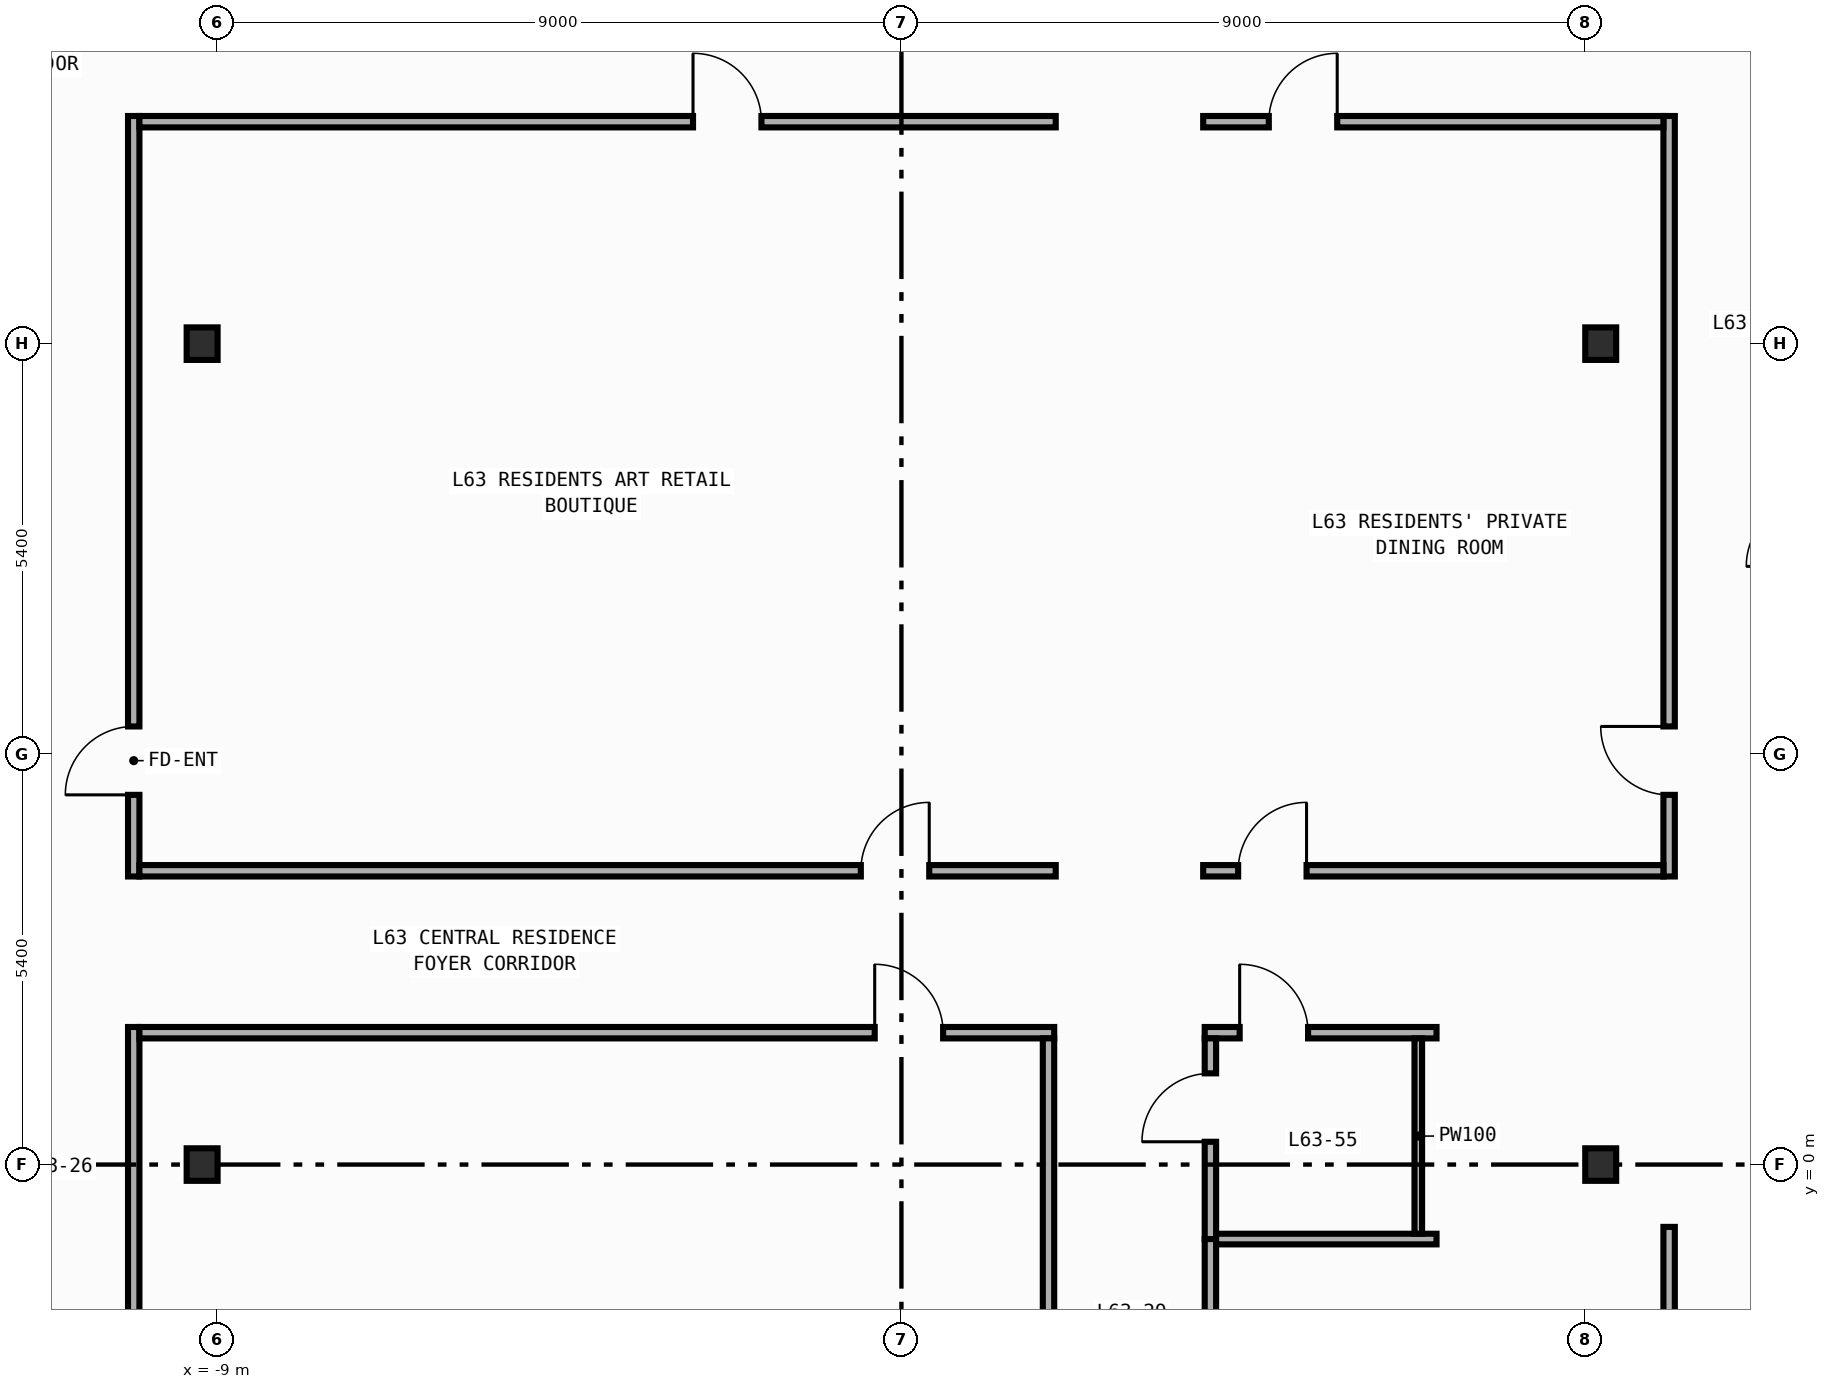
"""IFC4 building model, lengths in metres.
Left out: names, types, materials, properties, quantities, classifications, styles, units other than length and angle.
Written with IfcOpenShell. Run it as: python <this file> out.ifc"""

import sys

from ifc_helpers import new_model, si_unit, direction, frame, frame_2d, origin, origin_2d, place, context, subcontext, project, spatial, rectangle, i_section, extrude, element, fill, save


model = new_model("IFC4")
c1 = context("Model", 3, precision=1e-05, world=origin(), true_north=direction((0.0, 1.0)))
c2 = subcontext(c1, "Body", "Model", "MODEL_VIEW")
j1 = project(units=[si_unit("LENGTHUNIT", "METRE"), si_unit("PLANEANGLEUNIT", "RADIAN")], contexts=[c1])
p1 = place(None, origin())
s1 = spatial("IfcSite", under=j1, at=p1, CompositionType="ELEMENT")
p2 = place(p1, origin())
s2 = spatial("IfcBuilding", under=s1, at=p2, CompositionType="ELEMENT")
p3 = place(p2, frame((0.0, 0.0, 265.6)))
s3 = spatial("IfcBuildingStorey", under=s2, at=p3, CompositionType="ELEMENT", Elevation=265.6)
for number, where, z_axis, x_axis in (
    (1, (-9.2, 0.0, 0.0), (0.0, 0.0, 1.0), (1.0, 0.0, 0.0)),
    (2, (-9.2, 10.8, 0.0), (0.0, 0.0, 1.0), (1.0, 0.0, 0.0)),
    (3, (9.2, 0.0, 0.0), (0.0, 0.0, 1.0), (1.0, 0.0, 0.0)),
    (4, (9.2, 10.8, 0.0), (0.0, 0.0, 1.0), (1.0, 0.0, 0.0)),
):
    element("IfcColumn", number, at=place(p3, frame(where, z_axis=z_axis, x_axis=x_axis)), inside=s3, PredefinedType="COLUMN", context=c2, shape_type="SweptSolid", body=[
        extrude(i_section(OverallWidth=0.407, OverallDepth=0.428, WebThickness=0.02, FlangeThickness=0.035, FilletRadius=0.022, at=origin_2d()), origin(), (0.0, 0.0, 1.0), 3.6),
    ])
p4 = place(p3, frame((-10.1, 3.79, 0.0), z_axis=(0.0, 0.0, 1.0), x_axis=(0.0, 1.0, 0.0)))
e5 = element("IfcWall", 5, at=p4, inside=s3, PredefinedType="PARTITIONING", context=c2, shape_type="SweptSolid", body=[
    extrude(rectangle(XDim=10.005, YDim=0.15, at=frame_2d((5.002, 0.0))), origin(), (0.0, 0.0, 1.0), 3.34),
])
p5 = place(p4, frame((1.074, 0.0, 0.0)))
e6 = element("IfcOpeningElement", 6, at=p5, cuts=e5, PredefinedType="OPENING", context=c2, shape_type="SweptSolid", body=[
    extrude(rectangle(XDim=0.9, YDim=2.15, at=frame_2d((0.45, 1.075))), frame((0.0, 0.085, 0.0), z_axis=(0.0, -1.0, 0.0), x_axis=(1.0, 0.0, 0.0)), (0.0, 0.0, 1.0), 0.17),
])
p6 = place(p3, frame((-10.1, -13.795, 0.0), z_axis=(0.0, 0.0, 1.0), x_axis=(0.0, 1.0, 0.0)))
e7 = element("IfcWall", 7, at=p6, inside=s3, PredefinedType="PARTITIONING", context=c2, shape_type="SweptSolid", body=[
    extrude(rectangle(XDim=15.605, YDim=0.15, at=frame_2d((7.802, 0.0))), origin(), (0.0, 0.0, 1.0), 3.34),
])
p7 = place(p6, frame((7.961, 0.0, 0.0)))
e8 = element("IfcOpeningElement", 8, at=p7, cuts=e7, PredefinedType="OPENING", context=c2, shape_type="SweptSolid", body=[
    extrude(rectangle(XDim=0.9, YDim=2.15, at=frame_2d((0.45, 1.075))), frame((0.0, 0.085, 0.0), z_axis=(0.0, -1.0, 0.0), x_axis=(1.0, 0.0, 0.0)), (0.0, 0.0, 1.0), 0.17),
])
p8 = place(p3, frame((10.1, 3.79, 0.0), z_axis=(0.0, 0.0, 1.0), x_axis=(0.0, 1.0, 0.0)))
e9 = element("IfcWall", 9, at=p8, inside=s3, PredefinedType="PARTITIONING", context=c2, shape_type="SweptSolid", body=[
    extrude(rectangle(XDim=10.005, YDim=0.15, at=frame_2d((5.002, 0.0))), origin(), (0.0, 0.0, 1.0), 3.34),
])
p9 = place(p8, frame((1.074, 0.0, 0.0)))
e10 = element("IfcOpeningElement", 10, at=p9, cuts=e9, PredefinedType="OPENING", context=c2, shape_type="SweptSolid", body=[
    extrude(rectangle(XDim=0.9, YDim=2.15, at=frame_2d((0.45, 1.075))), frame((0.0, 0.085, 0.0), z_axis=(0.0, -1.0, 0.0), x_axis=(1.0, 0.0, 0.0)), (0.0, 0.0, 1.0), 0.17),
])
p10 = place(p3, frame((10.1, -13.795, 0.0), z_axis=(0.0, 0.0, 1.0), x_axis=(0.0, 1.0, 0.0)))
e11 = element("IfcWall", 11, at=p10, inside=s3, PredefinedType="PARTITIONING", context=c2, shape_type="SweptSolid", body=[
    extrude(rectangle(XDim=12.975, YDim=0.15, at=frame_2d((6.487, 0.0))), origin(), (0.0, 0.0, 1.0), 3.34),
])
p11 = place(p10, frame((7.964, 0.0, 0.0)))
e12 = element("IfcOpeningElement", 12, at=p11, cuts=e11, PredefinedType="OPENING", context=c2, shape_type="SweptSolid", body=[
    extrude(rectangle(XDim=0.9, YDim=2.15, at=frame_2d((0.45, 1.075))), frame((0.0, 0.085, 0.0), z_axis=(0.0, -1.0, 0.0), x_axis=(1.0, 0.0, 0.0)), (0.0, 0.0, 1.0), 0.17),
])
p12 = place(p3, frame((-10.025, 3.865, 0.0), z_axis=(0.0, 0.0, 1.0), x_axis=(1.0, 0.0, 0.0)))
e13 = element("IfcWall", 13, at=p12, inside=s3, PredefinedType="PARTITIONING", context=c2, shape_type="SweptSolid", body=[
    extrude(rectangle(XDim=12.055, YDim=0.15, at=frame_2d((6.027, 0.0))), origin(), (0.0, 0.0, 1.0), 3.34),
])
p13 = place(p12, frame((9.491, 0.0, 0.0)))
e14 = element("IfcOpeningElement", 14, at=p13, cuts=e13, PredefinedType="OPENING", context=c2, shape_type="SweptSolid", body=[
    extrude(rectangle(XDim=0.9, YDim=2.15, at=frame_2d((0.45, 1.075))), frame((0.0, 0.085, 0.0), z_axis=(0.0, -1.0, 0.0), x_axis=(1.0, 0.0, 0.0)), (0.0, 0.0, 1.0), 0.17),
])
p14 = place(p3, frame((-10.025, 1.735, 0.0), z_axis=(0.0, 0.0, 1.0), x_axis=(1.0, 0.0, 0.0)))
e15 = element("IfcWall", 15, at=p14, inside=s3, PredefinedType="PARTITIONING", context=c2, shape_type="SweptSolid", body=[
    extrude(rectangle(XDim=12.035, YDim=0.15, at=frame_2d((6.018, 0.0))), origin(), (0.0, 0.0, 1.0), 3.34),
])
p15 = place(p14, frame((9.674, 0.0, 0.0)))
e16 = element("IfcOpeningElement", 16, at=p15, cuts=e15, PredefinedType="OPENING", context=c2, shape_type="SweptSolid", body=[
    extrude(rectangle(XDim=0.9, YDim=2.15, at=frame_2d((0.45, 1.075))), frame((0.0, 0.085, 0.0), z_axis=(0.0, -1.0, 0.0), x_axis=(1.0, 0.0, 0.0)), (0.0, 0.0, 1.0), 0.17),
])
p16 = place(p3, frame((3.97, 3.865, 0.0), z_axis=(0.0, 0.0, 1.0), x_axis=(1.0, 0.0, 0.0)))
e17 = element("IfcWall", 17, at=p16, inside=s3, PredefinedType="PARTITIONING", context=c2, shape_type="SweptSolid", body=[
    extrude(rectangle(XDim=6.055, YDim=0.15, at=frame_2d((3.027, 0.0))), origin(), (0.0, 0.0, 1.0), 3.34),
])
p17 = place(p16, frame((0.46, 0.0, 0.0)))
e18 = element("IfcOpeningElement", 18, at=p17, cuts=e17, PredefinedType="OPENING", context=c2, shape_type="SweptSolid", body=[
    extrude(rectangle(XDim=0.9, YDim=2.15, at=frame_2d((0.45, 1.075))), frame((0.0, 0.085, 0.0), z_axis=(0.0, -1.0, 0.0), x_axis=(1.0, 0.0, 0.0)), (0.0, 0.0, 1.0), 0.17),
])
p18 = place(p3, frame((3.99, 1.735, 0.0), z_axis=(0.0, 0.0, 1.0), x_axis=(1.0, 0.0, 0.0)))
e19 = element("IfcWall", 19, at=p18, inside=s3, PredefinedType="PARTITIONING", context=c2, shape_type="SweptSolid", body=[
    extrude(rectangle(XDim=3.05, YDim=0.15, at=frame_2d((1.525, 0.0))), origin(), (0.0, 0.0, 1.0), 3.34),
])
p19 = place(p18, frame((0.46, 0.0, 0.0)))
e20 = element("IfcOpeningElement", 20, at=p19, cuts=e19, PredefinedType="OPENING", context=c2, shape_type="SweptSolid", body=[
    extrude(rectangle(XDim=0.9, YDim=2.15, at=frame_2d((0.45, 1.075))), frame((0.0, 0.085, 0.0), z_axis=(0.0, -1.0, 0.0), x_axis=(1.0, 0.0, 0.0)), (0.0, 0.0, 1.0), 0.17),
])
p20 = place(p3, frame((1.935, -13.795, 0.0), z_axis=(0.0, 0.0, 1.0), x_axis=(0.0, 1.0, 0.0)))
e21 = element("IfcWall", 21, at=p20, inside=s3, PredefinedType="PARTITIONING", context=c2, shape_type="SweptSolid", body=[
    extrude(rectangle(XDim=15.455, YDim=0.15, at=frame_2d((7.728, 0.0))), origin(), (0.0, 0.0, 1.0), 3.34),
])
p21 = place(p20, frame((7.879, 0.0, 0.0)))
e22 = element("IfcOpeningElement", 22, at=p21, cuts=e21, PredefinedType="OPENING", context=c2, shape_type="SweptSolid", body=[
    extrude(rectangle(XDim=0.9, YDim=2.15, at=frame_2d((0.45, 1.075))), frame((0.0, 0.085, 0.0), z_axis=(0.0, -1.0, 0.0), x_axis=(1.0, 0.0, 0.0)), (0.0, 0.0, 1.0), 0.17),
])
p22 = place(p3, frame((4.065, -0.98, 0.0), z_axis=(0.0, 0.0, 1.0), x_axis=(0.0, 1.0, 0.0)))
e23 = element("IfcWall", 23, at=p22, inside=s3, PredefinedType="PARTITIONING", context=c2, shape_type="SweptSolid", body=[
    extrude(rectangle(XDim=2.64, YDim=0.15, at=frame_2d((1.32, 0.0))), origin(), (0.0, 0.0, 1.0), 3.34),
])
p23 = place(p22, frame((1.28, 0.0, 0.0)))
e24 = element("IfcOpeningElement", 24, at=p23, cuts=e23, PredefinedType="OPENING", context=c2, shape_type="SweptSolid", body=[
    extrude(rectangle(XDim=0.9, YDim=2.15, at=frame_2d((0.45, 1.075))), frame((0.0, 0.085, 0.0), z_axis=(0.0, -1.0, 0.0), x_axis=(1.0, 0.0, 0.0)), (0.0, 0.0, 1.0), 0.17),
])
p24 = place(p3, frame((4.065, -13.795, 0.0), z_axis=(0.0, 0.0, 1.0), x_axis=(0.0, 1.0, 0.0)))
e25 = element("IfcWall", 25, at=p24, inside=s3, PredefinedType="PARTITIONING", context=c2, shape_type="SweptSolid", body=[
    extrude(rectangle(XDim=12.815, YDim=0.15, at=frame_2d((6.407, 0.0))), origin(), (0.0, 0.0, 1.0), 3.34),
])
p25 = place(p24, frame((7.994, 0.0, 0.0)))
e26 = element("IfcOpeningElement", 26, at=p25, cuts=e25, PredefinedType="OPENING", context=c2, shape_type="SweptSolid", body=[
    extrude(rectangle(XDim=0.9, YDim=2.15, at=frame_2d((0.45, 1.075))), frame((0.0, 0.085, 0.0), z_axis=(0.0, -1.0, 0.0), x_axis=(1.0, 0.0, 0.0)), (0.0, 0.0, 1.0), 0.17),
])
p26 = place(p3, frame((-10.025, 13.72, 0.0), z_axis=(0.0, 0.0, 1.0), x_axis=(1.0, 0.0, 0.0)))
e27 = element("IfcWall", 27, at=p26, inside=s3, PredefinedType="PARTITIONING", context=c2, shape_type="SweptSolid", body=[
    extrude(rectangle(XDim=12.055, YDim=0.15, at=frame_2d((6.027, 0.0))), origin(), (0.0, 0.0, 1.0), 3.34),
])
p27 = place(p26, frame((7.283, 0.0, 0.0)))
e28 = element("IfcOpeningElement", 28, at=p27, cuts=e27, PredefinedType="OPENING", context=c2, shape_type="SweptSolid", body=[
    extrude(rectangle(XDim=0.9, YDim=2.15, at=frame_2d((0.45, 1.075))), frame((0.0, 0.085, 0.0), z_axis=(0.0, -1.0, 0.0), x_axis=(1.0, 0.0, 0.0)), (0.0, 0.0, 1.0), 0.17),
])
p28 = place(p3, frame((3.97, 13.72, 0.0), z_axis=(0.0, 0.0, 1.0), x_axis=(1.0, 0.0, 0.0)))
e29 = element("IfcWall", 29, at=p28, inside=s3, PredefinedType="PARTITIONING", context=c2, shape_type="SweptSolid", body=[
    extrude(rectangle(XDim=6.055, YDim=0.15, at=frame_2d((3.027, 0.0))), origin(), (0.0, 0.0, 1.0), 3.34),
])
p29 = place(p28, frame((0.863, 0.0, 0.0)))
e30 = element("IfcOpeningElement", 30, at=p29, cuts=e29, PredefinedType="OPENING", context=c2, shape_type="SweptSolid", body=[
    extrude(rectangle(XDim=0.9, YDim=2.15, at=frame_2d((0.45, 1.075))), frame((0.0, 0.085, 0.0), z_axis=(0.0, -1.0, 0.0), x_axis=(1.0, 0.0, 0.0)), (0.0, 0.0, 1.0), 0.17),
])
p30 = place(p3, frame((4.14, -0.98, 0.0), z_axis=(0.0, 0.0, 1.0), x_axis=(1.0, 0.0, 0.0)))
e31 = element("IfcWall", 31, at=p30, inside=s3, PredefinedType="PARTITIONING", context=c2, shape_type="SweptSolid", body=[
    extrude(rectangle(XDim=2.9, YDim=0.14, at=frame_2d((1.45, 0.0))), origin(), (0.0, 0.0, 1.0), 3.34),
])
p31 = place(p3, frame((6.8, 1.66, 0.0), z_axis=(0.0, 0.0, 1.0), x_axis=(0.0, -1.0, 0.0)))
e32 = element("IfcWall", 32, at=p31, inside=s3, PredefinedType="PARTITIONING", context=c2, shape_type="SweptSolid", body=[
    extrude(rectangle(XDim=2.57, YDim=0.1, at=frame_2d((1.285, 0.0))), origin(), (0.0, 0.0, 1.0), 3.34),
])
p32 = place(p5, origin())
e33 = element("IfcDoor", 33, at=p32, inside=s3, OperationType="SINGLE_SWING_LEFT", PredefinedType="DOOR", context=c2, shape_type="SweptSolid", body=[
    extrude(rectangle(XDim=0.9, YDim=2.15, at=frame_2d((0.45, 1.075))), frame((0.0, 0.025, 0.0), z_axis=(0.0, -1.0, 0.0), x_axis=(1.0, 0.0, 0.0)), (0.0, 0.0, 1.0), 0.05),
])
fill(e6, e33)
p33 = place(p9, origin())
e34 = element("IfcDoor", 34, at=p33, inside=s3, OperationType="SINGLE_SWING_RIGHT", PredefinedType="DOOR", context=c2, shape_type="SweptSolid", body=[
    extrude(rectangle(XDim=0.9, YDim=2.15, at=frame_2d((0.45, 1.075))), frame((0.0, 0.025, 0.0), z_axis=(0.0, -1.0, 0.0), x_axis=(1.0, 0.0, 0.0)), (0.0, 0.0, 1.0), 0.05),
])
fill(e10, e34)
p34 = place(p13, origin())
e35 = element("IfcDoor", 35, at=p34, inside=s3, OperationType="SINGLE_SWING_RIGHT", PredefinedType="DOOR", context=c2, shape_type="SweptSolid", body=[
    extrude(rectangle(XDim=0.9, YDim=2.15, at=frame_2d((0.45, 1.075))), frame((0.0, 0.025, 0.0), z_axis=(0.0, -1.0, 0.0), x_axis=(1.0, 0.0, 0.0)), (0.0, 0.0, 1.0), 0.05),
])
fill(e14, e35)
p35 = place(p15, origin())
e36 = element("IfcDoor", 36, at=p35, inside=s3, OperationType="SINGLE_SWING_LEFT", PredefinedType="DOOR", context=c2, shape_type="SweptSolid", body=[
    extrude(rectangle(XDim=0.9, YDim=2.15, at=frame_2d((0.45, 1.075))), frame((0.0, 0.025, 0.0), z_axis=(0.0, -1.0, 0.0), x_axis=(1.0, 0.0, 0.0)), (0.0, 0.0, 1.0), 0.05),
])
fill(e16, e36)
p36 = place(p17, origin())
e37 = element("IfcDoor", 37, at=p36, inside=s3, OperationType="SINGLE_SWING_RIGHT", PredefinedType="DOOR", context=c2, shape_type="SweptSolid", body=[
    extrude(rectangle(XDim=0.9, YDim=2.15, at=frame_2d((0.45, 1.075))), frame((0.0, 0.025, 0.0), z_axis=(0.0, -1.0, 0.0), x_axis=(1.0, 0.0, 0.0)), (0.0, 0.0, 1.0), 0.05),
])
fill(e18, e37)
p37 = place(p19, origin())
e38 = element("IfcDoor", 38, at=p37, inside=s3, OperationType="SINGLE_SWING_LEFT", PredefinedType="DOOR", context=c2, shape_type="SweptSolid", body=[
    extrude(rectangle(XDim=0.9, YDim=2.15, at=frame_2d((0.45, 1.075))), frame((0.0, 0.025, 0.0), z_axis=(0.0, -1.0, 0.0), x_axis=(1.0, 0.0, 0.0)), (0.0, 0.0, 1.0), 0.05),
])
fill(e20, e38)
p38 = place(p23, origin())
e39 = element("IfcDoor", 39, at=p38, inside=s3, OperationType="SINGLE_SWING_LEFT", PredefinedType="DOOR", context=c2, shape_type="SweptSolid", body=[
    extrude(rectangle(XDim=0.9, YDim=2.15, at=frame_2d((0.45, 1.075))), frame((0.0, 0.025, 0.0), z_axis=(0.0, -1.0, 0.0), x_axis=(1.0, 0.0, 0.0)), (0.0, 0.0, 1.0), 0.05),
])
fill(e24, e39)
p39 = place(p27, origin())
e40 = element("IfcDoor", 40, at=p39, inside=s3, OperationType="SINGLE_SWING_LEFT", PredefinedType="DOOR", context=c2, shape_type="SweptSolid", body=[
    extrude(rectangle(XDim=0.9, YDim=2.15, at=frame_2d((0.45, 1.075))), frame((0.0, 0.025, 0.0), z_axis=(0.0, -1.0, 0.0), x_axis=(1.0, 0.0, 0.0)), (0.0, 0.0, 1.0), 0.05),
])
fill(e28, e40)
p40 = place(p29, origin())
e41 = element("IfcDoor", 41, at=p40, inside=s3, OperationType="SINGLE_SWING_RIGHT", PredefinedType="DOOR", context=c2, shape_type="SweptSolid", body=[
    extrude(rectangle(XDim=0.9, YDim=2.15, at=frame_2d((0.45, 1.075))), frame((0.0, 0.025, 0.0), z_axis=(0.0, -1.0, 0.0), x_axis=(1.0, 0.0, 0.0)), (0.0, 0.0, 1.0), 0.05),
])
fill(e30, e41)
save(model, sys.argv[1])
